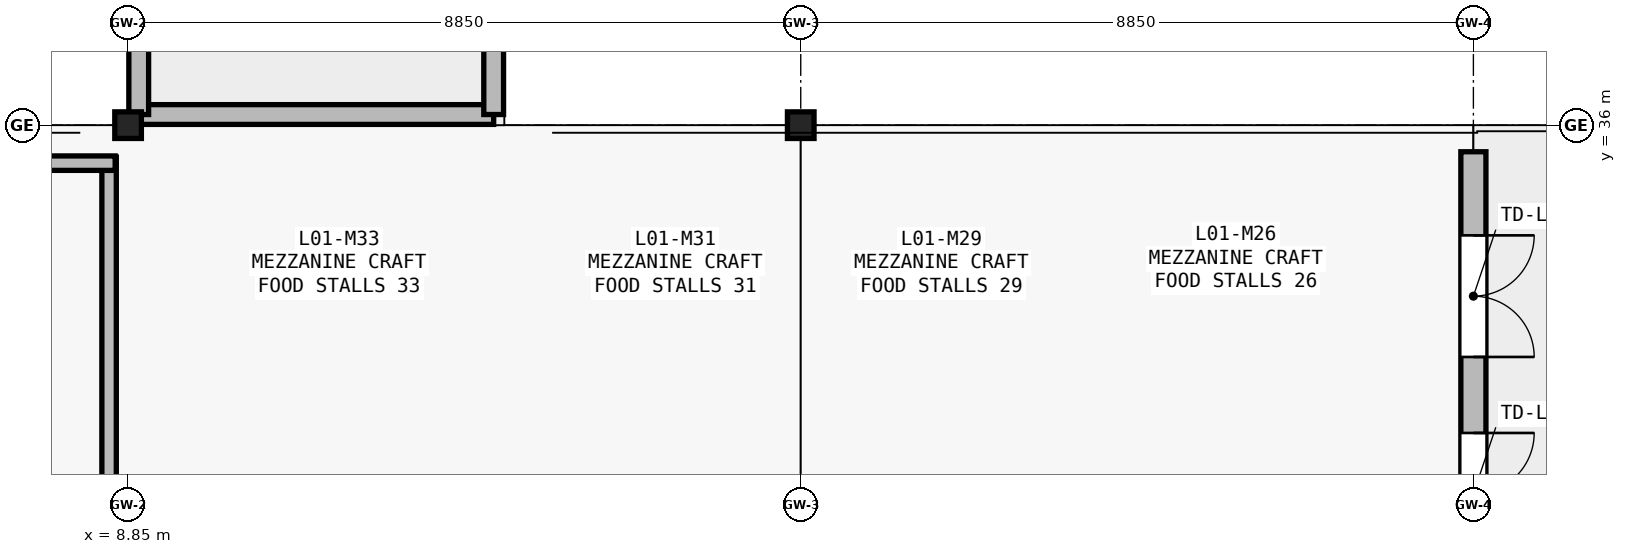
"""IFC4 building model, lengths in metres.
Left out: names, types, materials, properties, quantities, classifications, styles, units other than length and angle.
Written with IfcOpenShell. Run it as: python <this file> out.ifc"""

import sys

from ifc_helpers import new_model, si_unit, direction, frame, frame_2d, origin, origin_2d, place, context, subcontext, project, spatial, rectangle, i_section, extrude, element, fill, save


model = new_model("IFC4")
c1 = context("Model", 3, precision=1e-05, world=origin(), true_north=direction((0.0, 1.0)))
c2 = subcontext(c1, "Body", "Model", "MODEL_VIEW")
j1 = project(units=[si_unit("LENGTHUNIT", "METRE"), si_unit("PLANEANGLEUNIT", "RADIAN")], contexts=[c1])
p1 = place(None, origin())
s1 = spatial("IfcSite", under=j1, at=p1, CompositionType="ELEMENT")
p2 = place(p1, origin())
s2 = spatial("IfcBuilding", under=s1, at=p2, CompositionType="ELEMENT")
p3 = place(p2, frame((0.0, 0.0, 6.0)))
s3 = spatial("IfcBuildingStorey", under=s2, at=p3, CompositionType="ELEMENT", Elevation=6.0)
for number, where, z_axis, x_axis in (
    (1, (8.85, 36.0, 0.0), (0.0, 0.0, 1.0), (1.0, 0.0, 0.0)),
    (2, (17.7, 36.0, 0.0), (0.0, 0.0, 1.0), (1.0, 0.0, 0.0)),
):
    element("IfcColumn", number, at=place(p3, frame(where, z_axis=z_axis, x_axis=x_axis)), inside=s3, PredefinedType="COLUMN", context=c2, shape_type="SweptSolid", body=[
        extrude(i_section(OverallWidth=0.35, OverallDepth=0.35, WebThickness=0.012, FlangeThickness=0.019, FilletRadius=0.02, at=origin_2d()), origin(), (0.0, 0.0, 1.0), 4.8),
    ])
p4 = place(p3, frame((26.55, 35.65, 0.0), z_axis=(0.0, 0.0, 1.0), x_axis=(0.0, -1.0, 0.0)))
e3 = element("IfcWall", 3, at=p4, inside=s3, PredefinedType="SOLIDWALL", context=c2, shape_type="SweptSolid", body=[
    extrude(rectangle(XDim=6.668, YDim=0.33, at=frame_2d((3.334, 0.0))), origin(), (0.0, 0.0, 1.0), 3.95),
])
p5 = place(p4, frame((1.1, 0.0, 0.0)))
e4 = element("IfcOpeningElement", 4, at=p5, cuts=e3, PredefinedType="OPENING", context=c2, shape_type="SweptSolid", body=[
    extrude(rectangle(XDim=1.6, YDim=2.15, at=frame_2d((0.8, 1.075))), frame((0.0, 0.175, 0.0), z_axis=(0.0, -1.0, 0.0), x_axis=(1.0, 0.0, 0.0)), (0.0, 0.0, 1.0), 0.35),
])
p6 = place(p4, frame((3.7, 0.0, 0.0)))
e5 = element("IfcOpeningElement", 5, at=p6, cuts=e3, PredefinedType="OPENING", context=c2, shape_type="SweptSolid", body=[
    extrude(rectangle(XDim=1.6, YDim=2.15, at=frame_2d((0.8, 1.075))), frame((0.0, 0.175, 0.0), z_axis=(0.0, -1.0, 0.0), x_axis=(1.0, 0.0, 0.0)), (0.0, 0.0, 1.0), 0.35),
])
p7 = place(p3, frame((8.99, 36.14, 0.01), z_axis=(0.0, 0.0, 1.0), x_axis=(1.0, 0.0, 0.0)))
e6 = element("IfcWall", 6, at=p7, inside=s3, PredefinedType="PARAPET", context=c2, shape_type="SweptSolid", body=[
    extrude(rectangle(XDim=4.67, YDim=0.26, at=frame_2d((2.335, 0.0))), origin(), (0.0, 0.0, 1.0), 1.15),
])
for number, where, z_axis, x_axis in (
    (7, (13.66, 36.14, 0.01), (0.0, 0.0, 1.0), (0.0, 1.0, 0.0)),
    (8, (8.99, 77.86, 0.01), (0.0, 0.0, 1.0), (0.0, -1.0, 0.0)),
):
    element("IfcWall", number, at=place(p3, frame(where, z_axis=z_axis, x_axis=x_axis)), inside=s3, PredefinedType="PARAPET", context=c2, shape_type="SweptSolid", body=[
        extrude(rectangle(XDim=41.72, YDim=0.26, at=frame_2d((20.86, 0.0))), origin(), (0.0, 0.0, 1.0), 1.15),
    ])
p8 = place(p3, frame((8.6, 19.92, 0.0), z_axis=(0.0, 0.0, 1.0), x_axis=(0.0, 1.0, 0.0)))
e9 = element("IfcWall", 9, at=p8, inside=s3, PredefinedType="PARTITIONING", context=c2, shape_type="SweptSolid", body=[
    extrude(rectangle(XDim=15.66, YDim=0.19, at=frame_2d((7.83, 0.0))), origin(), (0.0, 0.0, 1.0), 4.015),
])
p9 = place(p3, frame((8.68, 35.5, 0.0), z_axis=(0.0, 0.0, 1.0), x_axis=(-1.0, 0.0, 0.0)))
e10 = element("IfcWall", 10, at=p9, inside=s3, PredefinedType="PARTITIONING", context=c2, shape_type="SweptSolid", body=[
    extrude(rectangle(XDim=8.48, YDim=0.19, at=frame_2d((4.24, 0.0))), origin(), (0.0, 0.0, 1.0), 4.32),
])
p10 = place(p5, origin())
e11 = element("IfcDoor", 11, at=p10, inside=s3, OperationType="DOUBLE_DOOR_SINGLE_SWING", PredefinedType="DOOR", context=c2, shape_type="SweptSolid", body=[
    extrude(rectangle(XDim=1.6, YDim=2.15, at=frame_2d((0.8, 1.075))), frame((0.0, 0.025, 0.0), z_axis=(0.0, -1.0, 0.0), x_axis=(1.0, 0.0, 0.0)), (0.0, 0.0, 1.0), 0.05),
])
fill(e4, e11)
p11 = place(p6, origin())
e12 = element("IfcDoor", 12, at=p11, inside=s3, OperationType="DOUBLE_DOOR_SINGLE_SWING", PredefinedType="DOOR", context=c2, shape_type="SweptSolid", body=[
    extrude(rectangle(XDim=1.6, YDim=2.15, at=frame_2d((0.8, 1.075))), frame((0.0, 0.025, 0.0), z_axis=(0.0, -1.0, 0.0), x_axis=(1.0, 0.0, 0.0)), (0.0, 0.0, 1.0), 0.05),
])
fill(e5, e12)
save(model, sys.argv[1])
